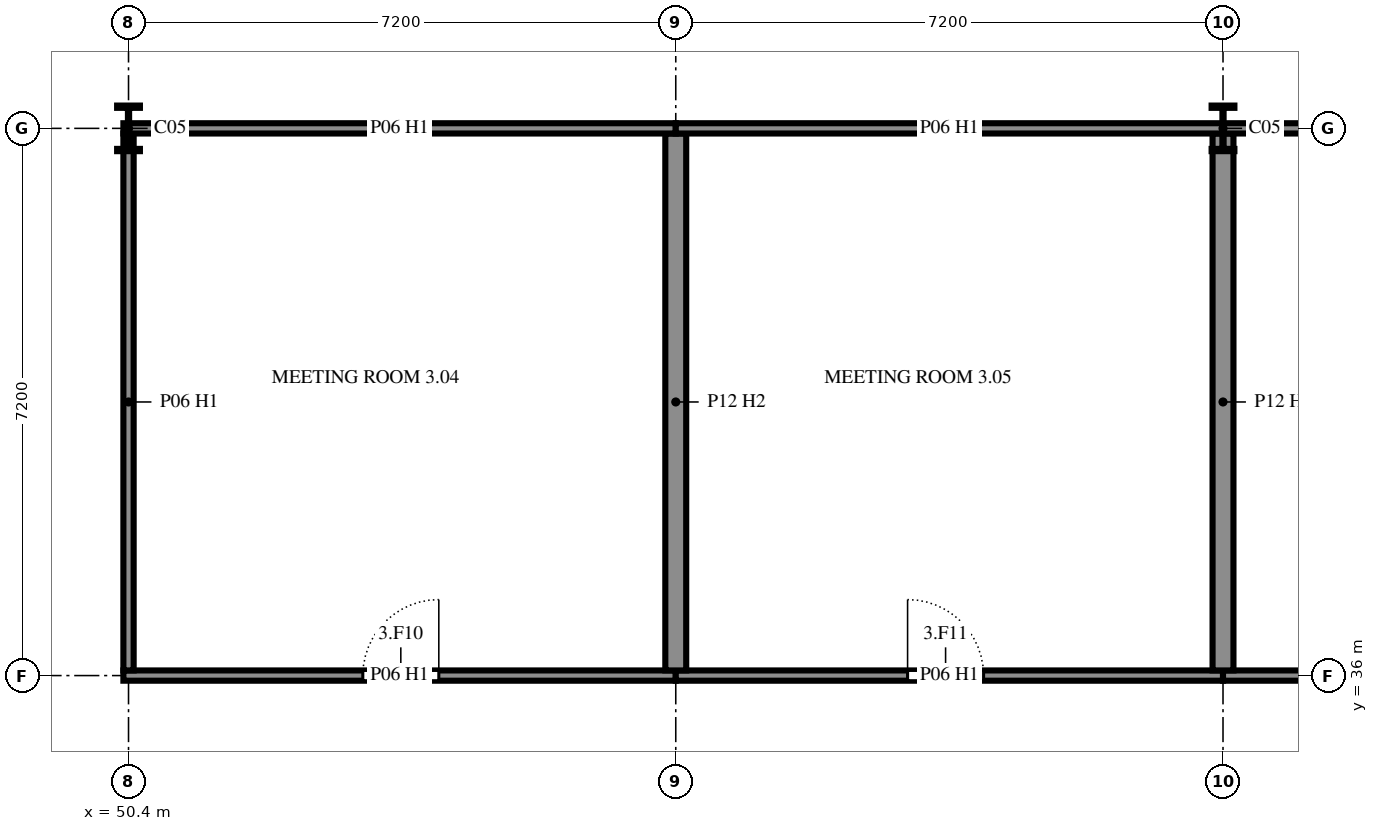
"""IFC4 building model, lengths in metres.
Left out: names, types, materials, properties, quantities, classifications, styles, units other than length and angle.
Written with IfcOpenShell. Run it as: python <this file> out.ifc"""

import sys

from ifc_helpers import new_model, si_unit, direction, frame, frame_2d, origin, origin_2d, place, context, subcontext, project, spatial, rectangle, i_section, extrude, element, fill, save


model = new_model("IFC4")
c1 = context("Model", 3, precision=1e-05, world=origin(), true_north=direction((0.0, 1.0)))
c2 = subcontext(c1, "Body", "Model", "MODEL_VIEW")
j1 = project(units=[si_unit("LENGTHUNIT", "METRE"), si_unit("PLANEANGLEUNIT", "RADIAN")], contexts=[c1])
p1 = place(None, origin())
s1 = spatial("IfcSite", under=j1, at=p1, CompositionType="ELEMENT")
p2 = place(p1, origin())
s2 = spatial("IfcBuilding", under=s1, at=p2, CompositionType="ELEMENT")
p3 = place(p2, frame((0.0, 0.0, 10.8)))
s3 = spatial("IfcBuildingStorey", under=s2, at=p3, CompositionType="ELEMENT", Elevation=10.8)
for number, where, z_axis, x_axis in (
    (1, (50.4, 43.2, 0.0), (0.0, 0.0, 1.0), (1.0, 0.0, 0.0)),
    (2, (64.8, 43.2, 0.0), (0.0, 0.0, 1.0), (1.0, 0.0, 0.0)),
):
    element("IfcColumn", number, at=place(p3, frame(where, z_axis=z_axis, x_axis=x_axis)), inside=s3, PredefinedType="COLUMN", context=c2, shape_type="SweptSolid", body=[
        extrude(i_section(OverallWidth=0.3, OverallDepth=0.6, WebThickness=0.015, FlangeThickness=0.03, FilletRadius=0.027, at=origin_2d()), origin(), (0.0, 0.0, 1.0), 3.6),
    ])
p4 = place(p3, frame((50.333, 36.0, 0.0), z_axis=(0.0, 0.0, 1.0), x_axis=(1.0, 0.0, 0.0)))
e3 = element("IfcWall", 3, at=p4, inside=s3, PredefinedType="PARTITIONING", context=c2, shape_type="SweptSolid", body=[
    extrude(rectangle(XDim=7.268, YDim=0.135, at=frame_2d((3.634, 0.0))), origin(), (0.0, 0.0, 1.0), 2.82),
])
p5 = place(p4, frame((3.15, 0.0, 0.0)))
e4 = element("IfcOpeningElement", 4, at=p5, cuts=e3, PredefinedType="OPENING", context=c2, shape_type="SweptSolid", body=[
    extrude(rectangle(XDim=1.0, YDim=2.4, at=frame_2d((0.5, 1.2))), frame((0.0, 0.077, 0.0), z_axis=(0.0, -1.0, 0.0), x_axis=(1.0, 0.0, 0.0)), (0.0, 0.0, 1.0), 0.155),
])
p6 = place(p3, frame((57.6, 36.0, 0.0), z_axis=(0.0, 0.0, 1.0), x_axis=(1.0, 0.0, 0.0)))
e5 = element("IfcWall", 5, at=p6, inside=s3, PredefinedType="PARTITIONING", context=c2, shape_type="SweptSolid", body=[
    extrude(rectangle(XDim=7.2, YDim=0.135, at=frame_2d((3.6, 0.0))), origin(), (0.0, 0.0, 1.0), 2.82),
])
p7 = place(p6, frame((3.05, 0.0, 0.0)))
e6 = element("IfcOpeningElement", 6, at=p7, cuts=e5, PredefinedType="OPENING", context=c2, shape_type="SweptSolid", body=[
    extrude(rectangle(XDim=1.0, YDim=2.4, at=frame_2d((0.5, 1.2))), frame((0.0, 0.077, 0.0), z_axis=(0.0, -1.0, 0.0), x_axis=(1.0, 0.0, 0.0)), (0.0, 0.0, 1.0), 0.155),
])
p8 = place(p3, frame((64.8, 36.0, 0.0), z_axis=(0.0, 0.0, 1.0), x_axis=(1.0, 0.0, 0.0)))
e7 = element("IfcWall", 7, at=p8, inside=s3, PredefinedType="PARTITIONING", context=c2, shape_type="SweptSolid", body=[
    extrude(rectangle(XDim=7.267, YDim=0.135, at=frame_2d((3.634, 0.0))), origin(), (0.0, 0.0, 1.0), 2.82),
])
p9 = place(p8, frame((3.15, 0.0, 0.0)))
e8 = element("IfcOpeningElement", 8, at=p9, cuts=e7, PredefinedType="OPENING", context=c2, shape_type="SweptSolid", body=[
    extrude(rectangle(XDim=1.0, YDim=2.4, at=frame_2d((0.5, 1.2))), frame((0.0, 0.077, 0.0), z_axis=(0.0, -1.0, 0.0), x_axis=(1.0, 0.0, 0.0)), (0.0, 0.0, 1.0), 0.155),
])
p10 = place(p3, frame((50.4, 43.133, 0.0), z_axis=(0.0, 0.0, 1.0), x_axis=(0.0, -1.0, 0.0)))
e9 = element("IfcWall", 9, at=p10, inside=s3, PredefinedType="PARTITIONING", context=c2, shape_type="SweptSolid", body=[
    extrude(rectangle(XDim=7.065, YDim=0.135, at=frame_2d((3.533, 0.0))), origin(), (0.0, 0.0, 1.0), 2.82),
])
p11 = place(p3, frame((57.6, 43.133, 0.0), z_axis=(0.0, 0.0, 1.0), x_axis=(0.0, -1.0, 0.0)))
e10 = element("IfcWall", 10, at=p11, inside=s3, PredefinedType="PARTITIONING", context=c2, shape_type="SweptSolid", body=[
    extrude(rectangle(XDim=7.065, YDim=0.275, at=frame_2d((3.533, 0.0))), origin(), (0.0, 0.0, 1.0), 3.12),
])
p12 = place(p3, frame((50.333, 43.2, 0.0), z_axis=(0.0, 0.0, 1.0), x_axis=(1.0, 0.0, 0.0)))
e11 = element("IfcWall", 11, at=p12, inside=s3, PredefinedType="PARTITIONING", context=c2, shape_type="SweptSolid", body=[
    extrude(rectangle(XDim=7.268, YDim=0.135, at=frame_2d((3.634, 0.0))), origin(), (0.0, 0.0, 1.0), 2.82),
])
p13 = place(p3, frame((64.8, 43.133, 0.0), z_axis=(0.0, 0.0, 1.0), x_axis=(0.0, -1.0, 0.0)))
e12 = element("IfcWall", 12, at=p13, inside=s3, PredefinedType="PARTITIONING", context=c2, shape_type="SweptSolid", body=[
    extrude(rectangle(XDim=7.065, YDim=0.275, at=frame_2d((3.533, 0.0))), origin(), (0.0, 0.0, 1.0), 2.82),
])
p14 = place(p3, frame((57.6, 43.2, 0.0), z_axis=(0.0, 0.0, 1.0), x_axis=(1.0, 0.0, 0.0)))
e13 = element("IfcWall", 13, at=p14, inside=s3, PredefinedType="PARTITIONING", context=c2, shape_type="SweptSolid", body=[
    extrude(rectangle(XDim=7.2, YDim=0.135, at=frame_2d((3.6, 0.0))), origin(), (0.0, 0.0, 1.0), 2.82),
])
p15 = place(p3, frame((64.8, 43.2, 0.0), z_axis=(0.0, 0.0, 1.0), x_axis=(1.0, 0.0, 0.0)))
e14 = element("IfcWall", 14, at=p15, inside=s3, PredefinedType="PARTITIONING", context=c2, shape_type="SweptSolid", body=[
    extrude(rectangle(XDim=7.267, YDim=0.135, at=frame_2d((3.634, 0.0))), origin(), (0.0, 0.0, 1.0), 2.82),
])
p16 = place(p5, origin())
e15 = element("IfcDoor", 15, at=p16, inside=s3, OperationType="SINGLE_SWING_LEFT", PredefinedType="DOOR", context=c2, shape_type="SweptSolid", body=[
    extrude(rectangle(XDim=1.0, YDim=2.4, at=frame_2d((0.5, 1.2))), frame((0.0, 0.025, 0.0), z_axis=(0.0, -1.0, 0.0), x_axis=(1.0, 0.0, 0.0)), (0.0, 0.0, 1.0), 0.05),
])
fill(e4, e15)
p17 = place(p7, origin())
e16 = element("IfcDoor", 16, at=p17, inside=s3, OperationType="SINGLE_SWING_RIGHT", PredefinedType="DOOR", context=c2, shape_type="SweptSolid", body=[
    extrude(rectangle(XDim=1.0, YDim=2.4, at=frame_2d((0.5, 1.2))), frame((0.0, 0.025, 0.0), z_axis=(0.0, -1.0, 0.0), x_axis=(1.0, 0.0, 0.0)), (0.0, 0.0, 1.0), 0.05),
])
fill(e6, e16)
save(model, sys.argv[1])
